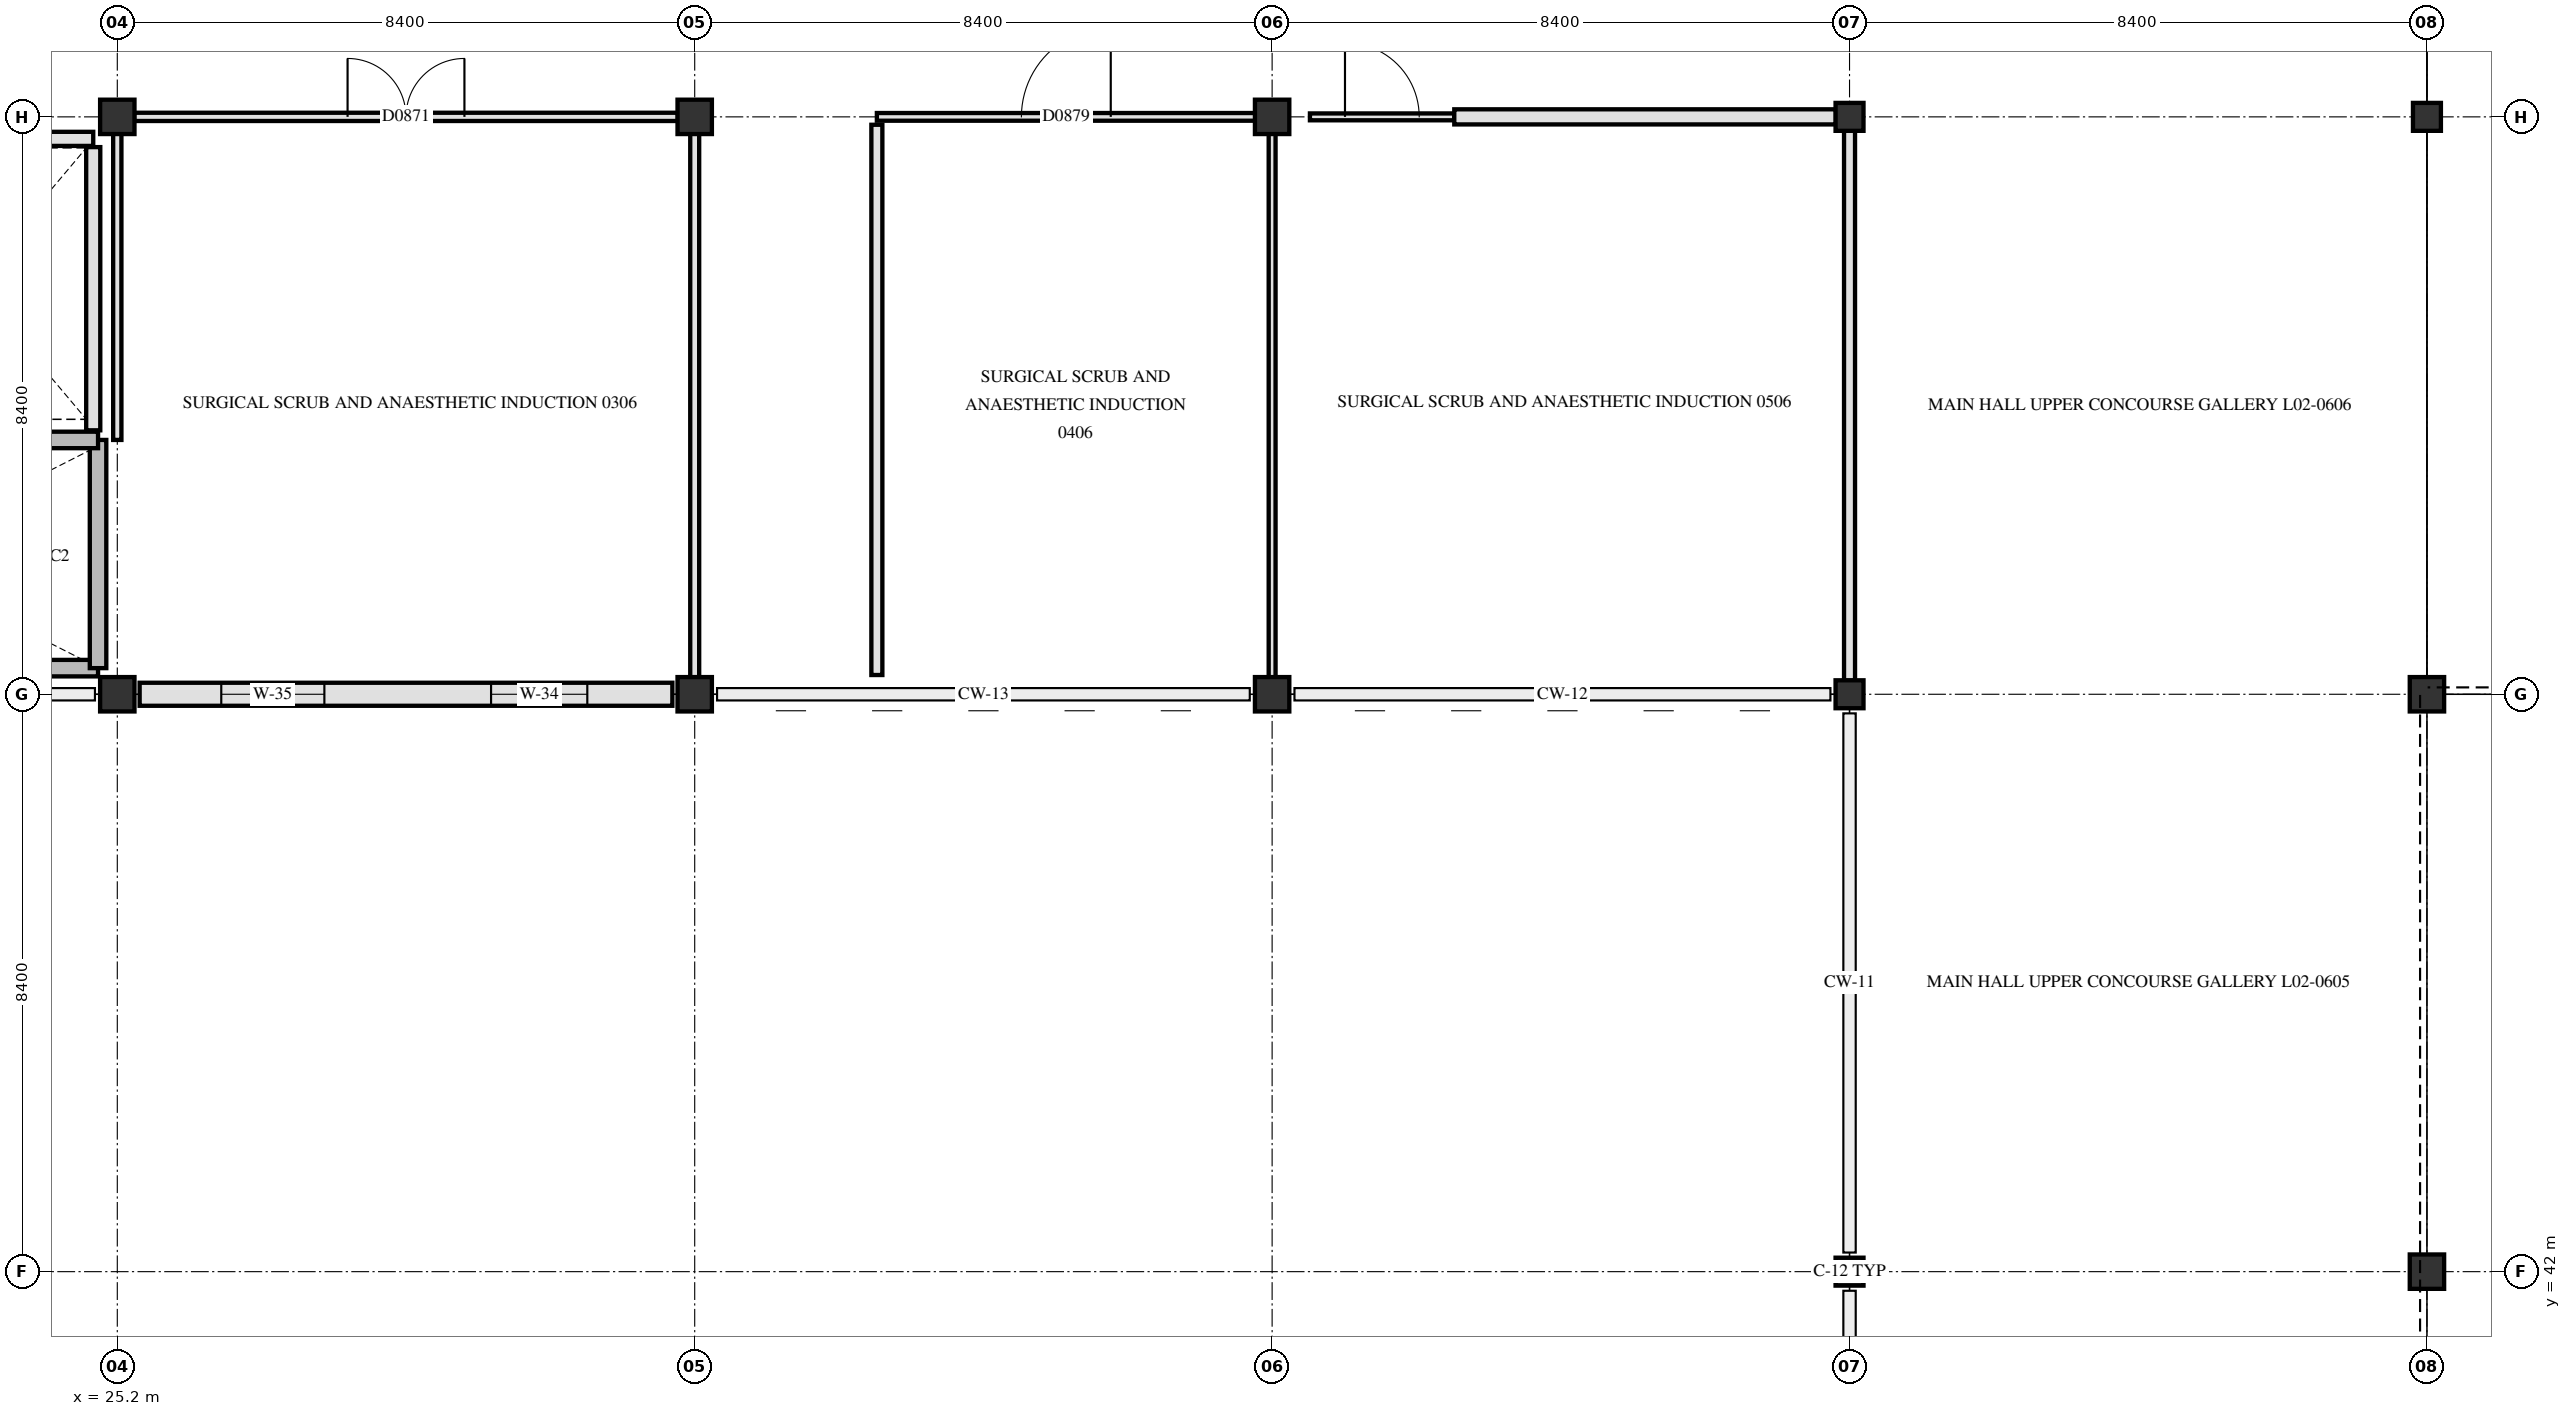
"""IFC4 building model, lengths in metres.
Left out: names, types, materials, properties, quantities, classifications, styles, units other than length and angle.
Written with IfcOpenShell. Run it as: python <this file> out.ifc"""

import sys

from ifc_helpers import new_model, si_unit, direction, frame, frame_2d, origin, origin_2d, place, context, subcontext, project, spatial, rectangle, hollow_circle, extrude, element, fill, save


model = new_model("IFC4")
c1 = context("Model", 3, precision=1e-05, world=origin(), true_north=direction((0.0, 1.0)))
c2 = subcontext(c1, "Body", "Model", "MODEL_VIEW")
j1 = project(units=[si_unit("LENGTHUNIT", "METRE"), si_unit("PLANEANGLEUNIT", "RADIAN")], contexts=[c1])
p1 = place(None, origin())
s1 = spatial("IfcSite", under=j1, at=p1, CompositionType="ELEMENT")
p2 = place(p1, origin())
s2 = spatial("IfcBuilding", under=s1, at=p2, CompositionType="ELEMENT")
p3 = place(p2, frame((0.0, 0.0, 9.3)))
s3 = spatial("IfcBuildingStorey", under=s2, at=p3, CompositionType="ELEMENT", Elevation=9.3)
for number, where, z_axis, x_axis in (
    (1, (25.2, 50.4, 0.0), (0.0, 0.0, 1.0), (1.0, 0.0, 0.0)),
    (2, (25.2, 58.8, 0.0), (0.0, 0.0, 1.0), (1.0, 0.0, 0.0)),
    (3, (33.6, 50.4, 0.0), (0.0, 0.0, 1.0), (1.0, 0.0, 0.0)),
    (4, (33.6, 58.8, 0.0), (0.0, 0.0, 1.0), (1.0, 0.0, 0.0)),
    (5, (42.0, 50.4, 0.0), (0.0, 0.0, 1.0), (1.0, 0.0, 0.0)),
    (6, (42.0, 58.8, 0.0), (0.0, 0.0, 1.0), (1.0, 0.0, 0.0)),
):
    element("IfcColumn", number, at=place(p3, frame(where, z_axis=z_axis, x_axis=x_axis)), inside=s3, PredefinedType="COLUMN", context=c2, shape_type="SweptSolid", body=[
        extrude(rectangle(XDim=0.5, YDim=0.5, at=origin_2d()), origin(), (0.0, 0.0, 1.0), 5.1),
    ])
for number, where, z_axis, x_axis in (
    (7, (50.4, 42.0, 0.0), (0.0, 0.0, 1.0), (1.0, 0.0, 0.0)),
    (8, (50.4, 50.4, 0.0), (0.0, 0.0, 1.0), (1.0, 0.0, 0.0)),
    (9, (50.4, 58.8, 0.0), (0.0, 0.0, 1.0), (1.0, 0.0, 0.0)),
):
    element("IfcColumn", number, at=place(p3, frame(where, z_axis=z_axis, x_axis=x_axis)), inside=s3, PredefinedType="COLUMN", context=c2, shape_type="SweptSolid", body=[
        extrude(hollow_circle(Radius=0.203, WallThickness=0.016, at=origin_2d()), origin(), (0.0, 0.0, 1.0), 5.1),
    ])
for number, where, z_axis, x_axis in (
    (10, (58.8, 42.0, 0.0), (0.0, 0.0, 1.0), (1.0, 0.0, 0.0)),
    (11, (58.8, 50.4, 0.0), (0.0, 0.0, 1.0), (1.0, 0.0, 0.0)),
):
    element("IfcColumn", number, at=place(p3, frame(where, z_axis=z_axis, x_axis=x_axis)), inside=s3, PredefinedType="COLUMN", context=c2, shape_type="SweptSolid", body=[
        extrude(rectangle(XDim=0.5, YDim=0.5, at=origin_2d()), origin(), (0.0, 0.0, 1.0), 5.1),
    ])
p4 = place(p3, frame((58.8, 58.8, 0.0), z_axis=(0.0, 0.0, 1.0), x_axis=(1.0, 0.0, 0.0)))
e12 = element("IfcColumn", 12, at=p4, inside=s3, PredefinedType="COLUMN", context=c2, shape_type="SweptSolid", body=[
    extrude(hollow_circle(Radius=0.203, WallThickness=0.016, at=origin_2d()), origin(), (0.0, 0.0, 1.0), 5.1),
])
p5 = place(p3, frame((33.275, 50.4, 0.0), z_axis=(0.0, 0.0, 1.0), x_axis=(-1.0, 0.0, 0.0)))
e13 = element("IfcWall", 13, at=p5, inside=s3, PredefinedType="SOLIDWALL", context=c2, shape_type="SweptSolid", body=[
    extrude(rectangle(XDim=7.75, YDim=0.335, at=frame_2d((3.875, 0.0))), origin(), (0.0, 0.0, 1.0), 4.07),
])
p6 = place(p5, frame((1.238, 0.0, 0.85)))
e14 = element("IfcOpeningElement", 14, at=p6, cuts=e13, PredefinedType="OPENING", context=c2, shape_type="SweptSolid", body=[
    extrude(rectangle(XDim=1.4, YDim=1.66, at=frame_2d((0.7, 0.83))), frame((0.0, 0.177, 0.0), z_axis=(0.0, -1.0, 0.0), x_axis=(1.0, 0.0, 0.0)), (0.0, 0.0, 1.0), 0.355),
])
p7 = place(p5, frame((5.062, 0.0, 0.85)))
e15 = element("IfcOpeningElement", 15, at=p7, cuts=e13, PredefinedType="OPENING", context=c2, shape_type="SweptSolid", body=[
    extrude(rectangle(XDim=1.5, YDim=1.66, at=frame_2d((0.75, 0.83))), frame((0.0, 0.177, 0.0), z_axis=(0.0, -1.0, 0.0), x_axis=(1.0, 0.0, 0.0)), (0.0, 0.0, 1.0), 0.355),
])
p8 = place(p3, frame((17.1, 50.78, 0.0), z_axis=(0.0, 0.0, 1.0), x_axis=(1.0, 0.0, 0.0)))
e16 = element("IfcWall", 16, at=p8, inside=s3, PredefinedType="SHEAR", context=c2, shape_type="SweptSolid", body=[
    extrude(rectangle(XDim=7.82, YDim=0.24, at=frame_2d((3.91, 0.0))), origin(), (0.0, 0.0, 1.0), 4.78),
])
p9 = place(p3, frame((24.92, 50.78, 0.0), z_axis=(0.0, 0.0, 1.0), x_axis=(0.0, 1.0, 0.0)))
e17 = element("IfcWall", 17, at=p9, inside=s3, PredefinedType="SHEAR", context=c2, shape_type="SweptSolid", body=[
    extrude(rectangle(XDim=3.32, YDim=0.24, at=frame_2d((1.66, 0.0))), origin(), (0.0, 0.0, 1.0), 4.78),
])
p10 = place(p3, frame((17.1, 54.1, 0.0), z_axis=(0.0, 0.0, 1.0), x_axis=(1.0, 0.0, 0.0)))
e18 = element("IfcWall", 18, at=p10, inside=s3, PredefinedType="SHEAR", context=c2, shape_type="SweptSolid", body=[
    extrude(rectangle(XDim=7.82, YDim=0.24, at=frame_2d((3.91, 0.0))), origin(), (0.0, 0.0, 1.0), 4.78),
])
p11 = place(p10, frame((0.25, 0.0, 0.0)))
e19 = element("IfcOpeningElement", 19, at=p11, cuts=e18, PredefinedType="OPENING", context=c2, shape_type="SweptSolid", body=[
    extrude(rectangle(XDim=1.45, YDim=2.2, at=frame_2d((0.725, 1.1))), frame((0.0, 0.13, 0.0), z_axis=(0.0, -1.0, 0.0), x_axis=(1.0, 0.0, 0.0)), (0.0, 0.0, 1.0), 0.26),
])
p12 = place(p3, frame((24.85, 54.24, 0.0), z_axis=(0.0, 0.0, 1.0), x_axis=(0.0, 1.0, 0.0)))
e20 = element("IfcWall", 20, at=p12, inside=s3, PredefinedType="PARTITIONING", context=c2, shape_type="SweptSolid", body=[
    extrude(rectangle(XDim=4.12, YDim=0.205, at=frame_2d((2.06, 0.0))), origin(), (0.0, 0.0, 1.0), 4.77),
])
p13 = place(p3, frame((21.28, 58.48, 0.0), z_axis=(0.0, 0.0, 1.0), x_axis=(1.0, 0.0, 0.0)))
e21 = element("IfcWall", 21, at=p13, inside=s3, PredefinedType="PARTITIONING", context=c2, shape_type="SweptSolid", body=[
    extrude(rectangle(XDim=3.57, YDim=0.205, at=frame_2d((1.785, 0.0))), origin(), (0.0, 0.0, 1.0), 4.02),
])
p14 = place(p3, frame((25.445, 58.8, 0.0), z_axis=(0.0, 0.0, 1.0), x_axis=(1.0, 0.0, 0.0)))
e22 = element("IfcWall", 22, at=p14, inside=s3, PredefinedType="PARTITIONING", context=c2, shape_type="SweptSolid", body=[
    extrude(rectangle(XDim=7.91, YDim=0.12, at=frame_2d((3.955, 0.0))), origin(), (0.0, 0.0, 1.0), 4.02),
])
p15 = place(p14, frame((3.105, 0.0, 0.0)))
e23 = element("IfcOpeningElement", 23, at=p15, cuts=e22, PredefinedType="OPENING", context=c2, shape_type="SweptSolid", body=[
    extrude(rectangle(XDim=1.7, YDim=2.25, at=frame_2d((0.85, 1.125))), frame((0.0, 0.07, 0.0), z_axis=(0.0, -1.0, 0.0), x_axis=(1.0, 0.0, 0.0)), (0.0, 0.0, 1.0), 0.14),
])
p16 = place(p3, frame((36.25, 58.8, 0.0), z_axis=(0.0, 0.0, 1.0), x_axis=(1.0, 0.0, 0.0)))
e24 = element("IfcWall", 24, at=p16, inside=s3, PredefinedType="PARTITIONING", context=c2, shape_type="SweptSolid", body=[
    extrude(rectangle(XDim=5.505, YDim=0.112, at=frame_2d((2.752, 0.0))), origin(), (0.0, 0.0, 1.0), 4.02),
])
p17 = place(p16, frame((2.103, 0.0, 0.0)))
e25 = element("IfcOpeningElement", 25, at=p17, cuts=e24, PredefinedType="OPENING", context=c2, shape_type="SweptSolid", body=[
    extrude(rectangle(XDim=1.3, YDim=2.2, at=frame_2d((0.65, 1.1))), frame((0.0, 0.066, 0.0), z_axis=(0.0, -1.0, 0.0), x_axis=(1.0, 0.0, 0.0)), (0.0, 0.0, 1.0), 0.132),
])
p18 = place(p3, frame((42.55, 58.8, 0.0), z_axis=(0.0, 0.0, 1.0), x_axis=(1.0, 0.0, 0.0)))
e26 = element("IfcWall", 26, at=p18, inside=s3, PredefinedType="PARTITIONING", context=c2, shape_type="SweptSolid", body=[
    extrude(rectangle(XDim=2.1, YDim=0.1, at=frame_2d((1.05, 0.0))), origin(), (0.0, 0.0, 1.0), 4.02),
])
p19 = place(p18, frame((0.51, 0.0, 0.0)))
e27 = element("IfcOpeningElement", 27, at=p19, cuts=e26, PredefinedType="OPENING", context=c2, shape_type="SweptSolid", body=[
    extrude(rectangle(XDim=1.08, YDim=2.12, at=frame_2d((0.54, 1.06))), frame((0.0, 0.06, 0.0), z_axis=(0.0, -1.0, 0.0), x_axis=(1.0, 0.0, 0.0)), (0.0, 0.0, 1.0), 0.12),
])
p20 = place(p3, frame((44.65, 58.8, 0.0), z_axis=(0.0, 0.0, 1.0), x_axis=(1.0, 0.0, 0.0)))
e28 = element("IfcWall", 28, at=p20, inside=s3, PredefinedType="PARTITIONING", context=c2, shape_type="SweptSolid", body=[
    extrude(rectangle(XDim=5.552, YDim=0.22, at=frame_2d((2.776, 0.0))), origin(), (0.0, 0.0, 1.0), 4.02),
])
p21 = place(p3, frame((25.2, 54.1, 0.0), z_axis=(0.0, 0.0, 1.0), x_axis=(0.0, 1.0, 0.0)))
e29 = element("IfcWall", 29, at=p21, inside=s3, PredefinedType="PARTITIONING", context=c2, shape_type="SweptSolid", body=[
    extrude(rectangle(XDim=4.455, YDim=0.12, at=frame_2d((2.228, 0.0))), origin(), (0.0, 0.0, 1.0), 4.17),
])
p22 = place(p3, frame((33.6, 50.645, 0.0), z_axis=(0.0, 0.0, 1.0), x_axis=(0.0, 1.0, 0.0)))
e30 = element("IfcWall", 30, at=p22, inside=s3, PredefinedType="PARTITIONING", context=c2, shape_type="SweptSolid", body=[
    extrude(rectangle(XDim=7.91, YDim=0.13, at=frame_2d((3.955, 0.0))), origin(), (0.0, 0.0, 1.0), 4.17),
])
p23 = place(p3, frame((36.25, 50.68, 0.0), z_axis=(0.0, 0.0, 1.0), x_axis=(0.0, 1.0, 0.0)))
e31 = element("IfcWall", 31, at=p23, inside=s3, PredefinedType="PARTITIONING", context=c2, shape_type="SweptSolid", body=[
    extrude(rectangle(XDim=8.005, YDim=0.16, at=frame_2d((4.002, 0.0))), origin(), (0.0, 0.0, 1.0), 4.02),
])
p24 = place(p3, frame((42.0, 50.645, 0.0), z_axis=(0.0, 0.0, 1.0), x_axis=(0.0, 1.0, 0.0)))
e32 = element("IfcWall", 32, at=p24, inside=s3, PredefinedType="PARTITIONING", context=c2, shape_type="SweptSolid", body=[
    extrude(rectangle(XDim=7.91, YDim=0.1, at=frame_2d((3.955, 0.0))), origin(), (0.0, 0.0, 1.0), 4.17),
])
p25 = place(p3, frame((50.4, 50.598, 0.0), z_axis=(0.0, 0.0, 1.0), x_axis=(0.0, 1.0, 0.0)))
e33 = element("IfcWall", 33, at=p25, inside=s3, PredefinedType="PARTITIONING", context=c2, shape_type="SweptSolid", body=[
    extrude(rectangle(XDim=8.004, YDim=0.16, at=frame_2d((4.002, 0.0))), origin(), (0.0, 0.0, 1.0), 4.37),
])
p26 = place(p6, origin())
e34 = element("IfcWindow", 34, at=p26, inside=s3, PartitioningType="SINGLE_PANEL", PredefinedType="WINDOW", context=c2, shape_type="SweptSolid", body=[
    extrude(rectangle(XDim=1.4, YDim=1.66, at=frame_2d((0.7, 0.83))), frame((0.0, 0.03, 0.0), z_axis=(0.0, -1.0, 0.0), x_axis=(1.0, 0.0, 0.0)), (0.0, 0.0, 1.0), 0.06),
])
fill(e14, e34)
p27 = place(p7, origin())
e35 = element("IfcWindow", 35, at=p27, inside=s3, PartitioningType="SINGLE_PANEL", PredefinedType="WINDOW", context=c2, shape_type="SweptSolid", body=[
    extrude(rectangle(XDim=1.5, YDim=1.66, at=frame_2d((0.75, 0.83))), frame((0.0, 0.03, 0.0), z_axis=(0.0, -1.0, 0.0), x_axis=(1.0, 0.0, 0.0)), (0.0, 0.0, 1.0), 0.06),
])
fill(e15, e35)
p28 = place(p15, origin())
e36 = element("IfcDoor", 36, at=p28, inside=s3, OperationType="DOUBLE_SWING_RIGHT", PredefinedType="DOOR", context=c2, shape_type="SweptSolid", body=[
    extrude(rectangle(XDim=1.7, YDim=2.25, at=frame_2d((0.85, 1.125))), frame((0.0, 0.025, 0.0), z_axis=(0.0, -1.0, 0.0), x_axis=(1.0, 0.0, 0.0)), (0.0, 0.0, 1.0), 0.05),
])
fill(e23, e36)
p29 = place(p17, origin())
e37 = element("IfcDoor", 37, at=p29, inside=s3, OperationType="SINGLE_SWING_RIGHT", PredefinedType="DOOR", context=c2, shape_type="SweptSolid", body=[
    extrude(rectangle(XDim=1.3, YDim=2.2, at=frame_2d((0.65, 1.1))), frame((0.0, 0.025, 0.0), z_axis=(0.0, -1.0, 0.0), x_axis=(1.0, 0.0, 0.0)), (0.0, 0.0, 1.0), 0.05),
])
fill(e25, e37)
p30 = place(p19, origin())
e38 = element("IfcDoor", 38, at=p30, inside=s3, OperationType="SINGLE_SWING_LEFT", PredefinedType="DOOR", context=c2, shape_type="SweptSolid", body=[
    extrude(rectangle(XDim=1.08, YDim=2.12, at=frame_2d((0.54, 1.06))), frame((0.0, 0.025, 0.0), z_axis=(0.0, -1.0, 0.0), x_axis=(1.0, 0.0, 0.0)), (0.0, 0.0, 1.0), 0.05),
])
fill(e27, e38)
save(model, sys.argv[1])
